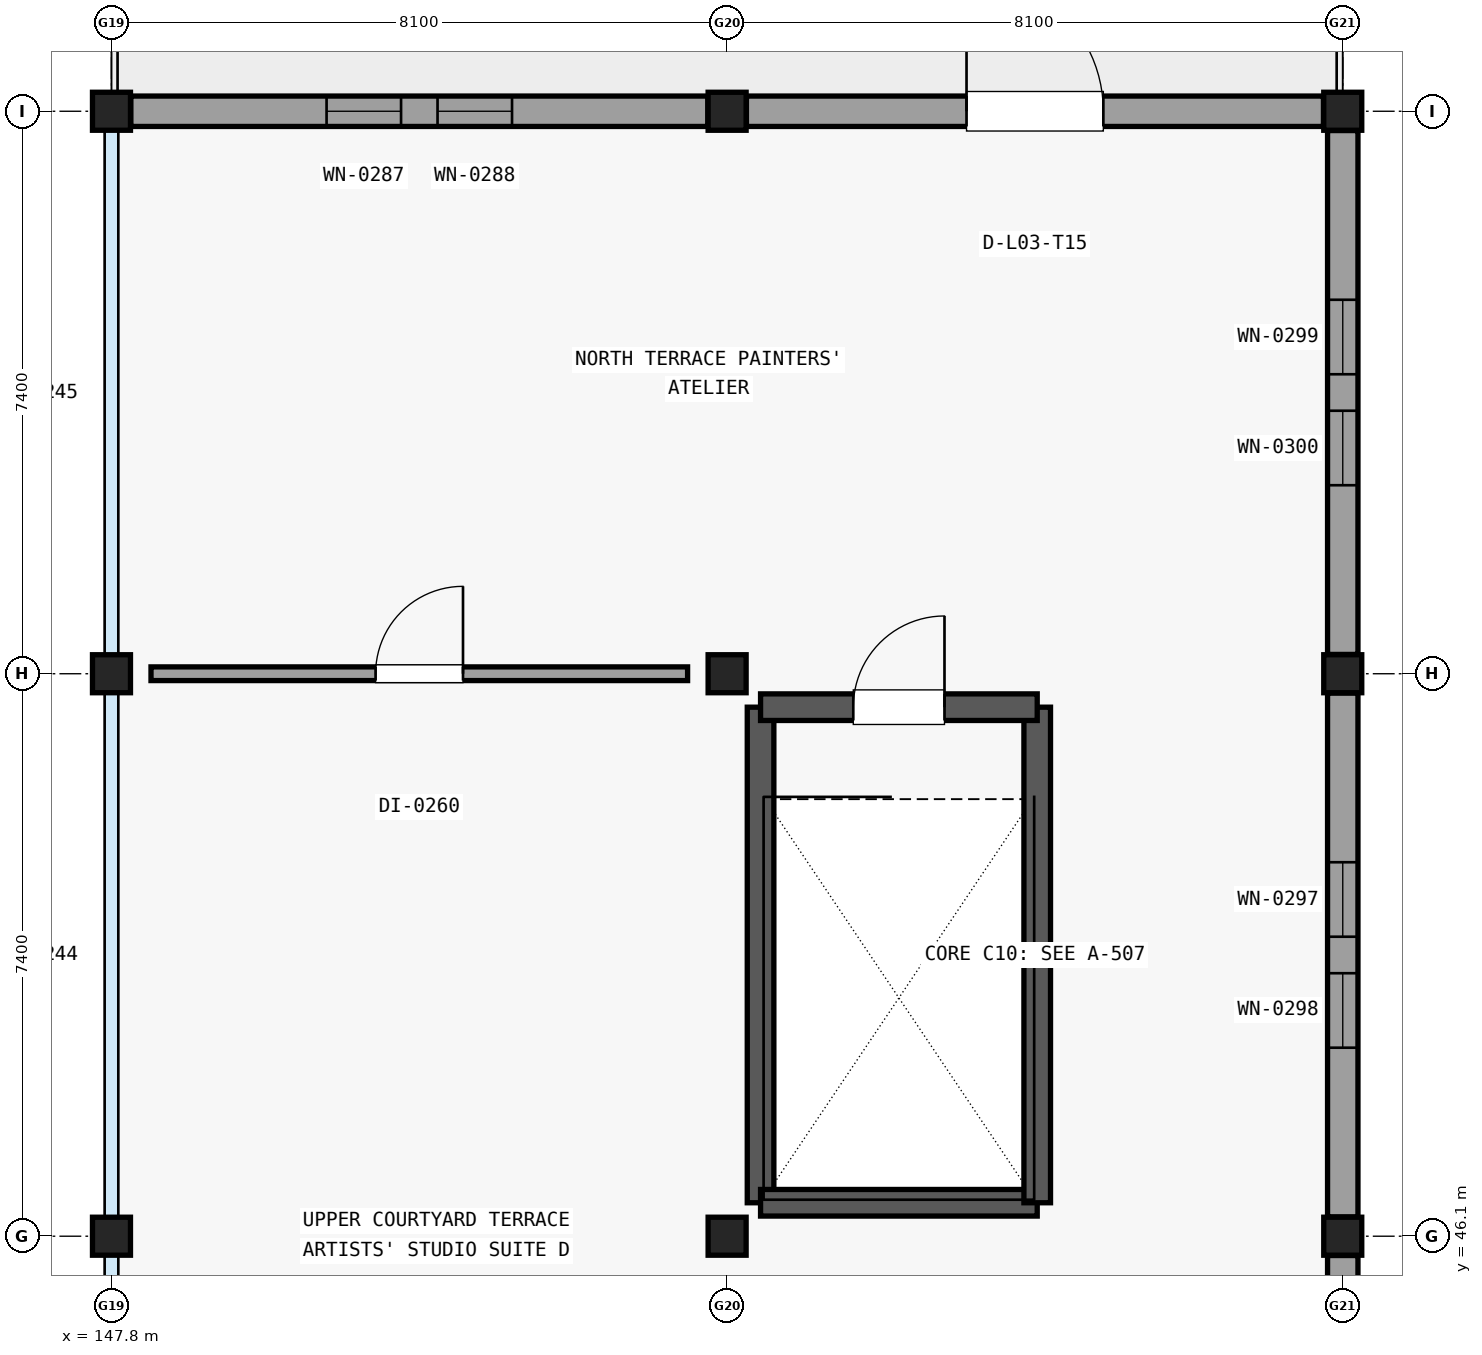
"""IFC4 building model, lengths in metres.
Left out: names, types, materials, properties, quantities, classifications, styles, units other than length and angle.
Written with IfcOpenShell. Run it as: python <this file> out.ifc"""

import sys

from ifc_helpers import new_model, si_unit, direction, frame, frame_2d, origin, origin_2d, place, context, subcontext, project, spatial, rectangle, extrude, element, fill, save


model = new_model("IFC4")
c1 = context("Model", 3, precision=1e-05, world=origin(), true_north=direction((0.0, 1.0)))
c2 = subcontext(c1, "Body", "Model", "MODEL_VIEW")
j1 = project(units=[si_unit("LENGTHUNIT", "METRE"), si_unit("PLANEANGLEUNIT", "RADIAN")], contexts=[c1])
p1 = place(None, origin())
s1 = spatial("IfcSite", under=j1, at=p1, CompositionType="ELEMENT")
p2 = place(p1, origin())
s2 = spatial("IfcBuilding", under=s1, at=p2, CompositionType="ELEMENT")
p3 = place(p2, frame((0.0, 0.0, 13.8)))
s3 = spatial("IfcBuildingStorey", under=s2, at=p3, CompositionType="ELEMENT", Elevation=13.8)
for number, where, z_axis, x_axis in (
    (1, (147.8, 46.1, 0.0), (0.0, 0.0, 1.0), (1.0, 0.0, 0.0)),
    (2, (147.8, 53.5, 0.0), (0.0, 0.0, 1.0), (1.0, 0.0, 0.0)),
    (3, (147.8, 60.9, 0.0), (0.0, 0.0, 1.0), (1.0, 0.0, 0.0)),
    (4, (155.9, 46.1, 0.0), (0.0, 0.0, 1.0), (1.0, 0.0, 0.0)),
    (5, (155.9, 53.5, 0.0), (0.0, 0.0, 1.0), (1.0, 0.0, 0.0)),
    (6, (155.9, 60.9, 0.0), (0.0, 0.0, 1.0), (1.0, 0.0, 0.0)),
    (7, (164.0, 46.1, 0.0), (0.0, 0.0, 1.0), (1.0, 0.0, 0.0)),
    (8, (164.0, 53.5, 0.0), (0.0, 0.0, 1.0), (1.0, 0.0, 0.0)),
    (9, (164.0, 60.9, 0.0), (0.0, 0.0, 1.0), (1.0, 0.0, 0.0)),
):
    element("IfcColumn", number, at=place(p3, frame(where, z_axis=z_axis, x_axis=x_axis)), inside=s3, PredefinedType="COLUMN", context=c2, shape_type="SweptSolid", body=[
        extrude(rectangle(XDim=0.5, YDim=0.5, at=origin_2d()), origin(), (0.0, 0.0, 1.0), 3.38),
    ])
p4 = place(p3, frame((148.054, 60.9, 0.0), z_axis=(0.0, 0.0, 1.0), x_axis=(1.0, 0.0, 0.0)))
e10 = element("IfcWall", 10, at=p4, inside=s3, PredefinedType="SOLIDWALL", context=c2, shape_type="SweptSolid", body=[
    extrude(rectangle(XDim=7.592, YDim=0.4, at=frame_2d((3.796, 0.0))), origin(), (0.0, 0.0, 1.0), 2.908),
])
p5 = place(p4, frame((2.576, 0.0, 0.6)))
e11 = element("IfcOpeningElement", 11, at=p5, cuts=e10, PredefinedType="OPENING", context=c2, shape_type="SweptSolid", body=[
    extrude(rectangle(XDim=0.98, YDim=1.95, at=frame_2d((0.49, 0.975))), frame((0.0, 0.21, 0.0), z_axis=(0.0, -1.0, 0.0), x_axis=(1.0, 0.0, 0.0)), (0.0, 0.0, 1.0), 0.42),
])
p6 = place(p4, frame((4.036, 0.0, 0.6)))
e12 = element("IfcOpeningElement", 12, at=p6, cuts=e10, PredefinedType="OPENING", context=c2, shape_type="SweptSolid", body=[
    extrude(rectangle(XDim=0.98, YDim=1.95, at=frame_2d((0.49, 0.975))), frame((0.0, 0.21, 0.0), z_axis=(0.0, -1.0, 0.0), x_axis=(1.0, 0.0, 0.0)), (0.0, 0.0, 1.0), 0.42),
])
p7 = place(p3, frame((164.0, 45.846, 0.0), z_axis=(0.0, 0.0, 1.0), x_axis=(0.0, -1.0, 0.0)))
e13 = element("IfcWall", 13, at=p7, inside=s3, PredefinedType="SOLIDWALL", context=c2, shape_type="SweptSolid", body=[
    extrude(rectangle(XDim=6.892, YDim=0.4, at=frame_2d((3.446, 0.0))), origin(), (0.0, 0.0, 1.0), 2.908),
])
p8 = place(p7, frame((2.226, 0.0, 0.6)))
e14 = element("IfcOpeningElement", 14, at=p8, cuts=e13, PredefinedType="OPENING", context=c2, shape_type="SweptSolid", body=[
    extrude(rectangle(XDim=0.98, YDim=1.95, at=frame_2d((0.49, 0.975))), frame((0.0, 0.21, 0.0), z_axis=(0.0, -1.0, 0.0), x_axis=(1.0, 0.0, 0.0)), (0.0, 0.0, 1.0), 0.42),
])
p9 = place(p7, frame((3.686, 0.0, 0.6)))
e15 = element("IfcOpeningElement", 15, at=p9, cuts=e13, PredefinedType="OPENING", context=c2, shape_type="SweptSolid", body=[
    extrude(rectangle(XDim=0.98, YDim=1.95, at=frame_2d((0.49, 0.975))), frame((0.0, 0.21, 0.0), z_axis=(0.0, -1.0, 0.0), x_axis=(1.0, 0.0, 0.0)), (0.0, 0.0, 1.0), 0.42),
])
p10 = place(p3, frame((164.0, 53.246, 0.0), z_axis=(0.0, 0.0, 1.0), x_axis=(0.0, -1.0, 0.0)))
e16 = element("IfcWall", 16, at=p10, inside=s3, PredefinedType="SOLIDWALL", context=c2, shape_type="SweptSolid", body=[
    extrude(rectangle(XDim=6.892, YDim=0.4, at=frame_2d((3.446, 0.0))), origin(), (0.0, 0.0, 1.0), 2.908),
])
p11 = place(p10, frame((2.226, 0.0, 0.6)))
e17 = element("IfcOpeningElement", 17, at=p11, cuts=e16, PredefinedType="OPENING", context=c2, shape_type="SweptSolid", body=[
    extrude(rectangle(XDim=0.98, YDim=1.95, at=frame_2d((0.49, 0.975))), frame((0.0, 0.21, 0.0), z_axis=(0.0, -1.0, 0.0), x_axis=(1.0, 0.0, 0.0)), (0.0, 0.0, 1.0), 0.42),
])
p12 = place(p10, frame((3.686, 0.0, 0.6)))
e18 = element("IfcOpeningElement", 18, at=p12, cuts=e16, PredefinedType="OPENING", context=c2, shape_type="SweptSolid", body=[
    extrude(rectangle(XDim=0.98, YDim=1.95, at=frame_2d((0.49, 0.975))), frame((0.0, 0.21, 0.0), z_axis=(0.0, -1.0, 0.0), x_axis=(1.0, 0.0, 0.0)), (0.0, 0.0, 1.0), 0.42),
])
p13 = place(p3, frame((156.154, 60.9, 0.0), z_axis=(0.0, 0.0, 1.0), x_axis=(1.0, 0.0, 0.0)))
e19 = element("IfcWall", 19, at=p13, inside=s3, PredefinedType="SOLIDWALL", context=c2, shape_type="SweptSolid", body=[
    extrude(rectangle(XDim=7.592, YDim=0.4, at=frame_2d((3.796, 0.0))), origin(), (0.0, 0.0, 1.0), 2.908),
])
p14 = place(p13, frame((2.896, 0.0, 0.0)))
e20 = element("IfcOpeningElement", 20, at=p14, cuts=e19, PredefinedType="OPENING", context=c2, shape_type="SweptSolid", body=[
    extrude(rectangle(XDim=1.8, YDim=2.2, at=frame_2d((0.9, 1.1))), frame((0.0, 0.21, 0.0), z_axis=(0.0, -1.0, 0.0), x_axis=(1.0, 0.0, 0.0)), (0.0, 0.0, 1.0), 0.42),
])
p15 = place(p3, frame((164.0, 60.646, 0.0), z_axis=(0.0, 0.0, 1.0), x_axis=(0.0, -1.0, 0.0)))
e21 = element("IfcWall", 21, at=p15, inside=s3, PredefinedType="SOLIDWALL", context=c2, shape_type="SweptSolid", body=[
    extrude(rectangle(XDim=6.892, YDim=0.4, at=frame_2d((3.446, 0.0))), origin(), (0.0, 0.0, 1.0), 2.908),
])
p16 = place(p15, frame((2.226, 0.0, 0.6)))
e22 = element("IfcOpeningElement", 22, at=p16, cuts=e21, PredefinedType="OPENING", context=c2, shape_type="SweptSolid", body=[
    extrude(rectangle(XDim=0.98, YDim=1.95, at=frame_2d((0.49, 0.975))), frame((0.0, 0.21, 0.0), z_axis=(0.0, -1.0, 0.0), x_axis=(1.0, 0.0, 0.0)), (0.0, 0.0, 1.0), 0.42),
])
p17 = place(p15, frame((3.686, 0.0, 0.6)))
e23 = element("IfcOpeningElement", 23, at=p17, cuts=e21, PredefinedType="OPENING", context=c2, shape_type="SweptSolid", body=[
    extrude(rectangle(XDim=0.98, YDim=1.95, at=frame_2d((0.49, 0.975))), frame((0.0, 0.21, 0.0), z_axis=(0.0, -1.0, 0.0), x_axis=(1.0, 0.0, 0.0)), (0.0, 0.0, 1.0), 0.42),
])
p18 = place(p3, frame((156.34, 46.54, 0.0), z_axis=(0.0, 0.0, 1.0), x_axis=(0.0, 1.0, 0.0)))
e24 = element("IfcWall", 24, at=p18, inside=s3, PredefinedType="SHEAR", context=c2, shape_type="SweptSolid", body=[
    extrude(rectangle(XDim=6.52, YDim=0.35, at=frame_2d((3.26, 0.0))), origin(), (0.0, 0.0, 1.0), 3.375),
])
p19 = place(p3, frame((156.34, 46.54, 0.0), z_axis=(0.0, 0.0, 1.0), x_axis=(1.0, 0.0, 0.0)))
e25 = element("IfcWall", 25, at=p19, inside=s3, PredefinedType="SHEAR", context=c2, shape_type="SweptSolid", body=[
    extrude(rectangle(XDim=3.64, YDim=0.35, at=frame_2d((1.82, 0.0))), origin(), (0.0, 0.0, 1.0), 3.375),
])
p20 = place(p3, frame((159.98, 46.54, 0.0), z_axis=(0.0, 0.0, 1.0), x_axis=(0.0, 1.0, 0.0)))
e26 = element("IfcWall", 26, at=p20, inside=s3, PredefinedType="SHEAR", context=c2, shape_type="SweptSolid", body=[
    extrude(rectangle(XDim=6.52, YDim=0.35, at=frame_2d((3.26, 0.0))), origin(), (0.0, 0.0, 1.0), 3.375),
])
p21 = place(p3, frame((156.34, 53.06, 0.0), z_axis=(0.0, 0.0, 1.0), x_axis=(1.0, 0.0, 0.0)))
e27 = element("IfcWall", 27, at=p21, inside=s3, PredefinedType="SHEAR", context=c2, shape_type="SweptSolid", body=[
    extrude(rectangle(XDim=3.64, YDim=0.35, at=frame_2d((1.82, 0.0))), origin(), (0.0, 0.0, 1.0), 3.375),
])
p22 = place(p21, frame((1.22, 0.0, 0.0)))
e28 = element("IfcOpeningElement", 28, at=p22, cuts=e27, PredefinedType="OPENING", context=c2, shape_type="SweptSolid", body=[
    extrude(rectangle(XDim=1.2, YDim=2.15, at=frame_2d((0.6, 1.075))), frame((0.0, 0.185, 0.0), z_axis=(0.0, -1.0, 0.0), x_axis=(1.0, 0.0, 0.0)), (0.0, 0.0, 1.0), 0.37),
])
p23 = place(p3, frame((148.32, 53.5, 0.0), z_axis=(0.0, 0.0, 1.0), x_axis=(1.0, 0.0, 0.0)))
e29 = element("IfcWall", 29, at=p23, inside=s3, PredefinedType="PARTITIONING", context=c2, shape_type="SweptSolid", body=[
    extrude(rectangle(XDim=7.06, YDim=0.18, at=frame_2d((3.53, 0.0))), origin(), (0.0, 0.0, 1.0), 2.913),
])
p24 = place(p23, frame((2.955, 0.0, 0.0)))
e30 = element("IfcOpeningElement", 30, at=p24, cuts=e29, PredefinedType="OPENING", context=c2, shape_type="SweptSolid", body=[
    extrude(rectangle(XDim=1.15, YDim=2.15, at=frame_2d((0.575, 1.075))), frame((0.0, 0.1, 0.0), z_axis=(0.0, -1.0, 0.0), x_axis=(1.0, 0.0, 0.0)), (0.0, 0.0, 1.0), 0.2),
])
p25 = place(p5, origin())
e31 = element("IfcWindow", 31, at=p25, inside=s3, PartitioningType="SINGLE_PANEL", PredefinedType="WINDOW", context=c2, shape_type="SweptSolid", body=[
    extrude(rectangle(XDim=0.98, YDim=1.95, at=frame_2d((0.49, 0.975))), frame((0.0, 0.03, 0.0), z_axis=(0.0, -1.0, 0.0), x_axis=(1.0, 0.0, 0.0)), (0.0, 0.0, 1.0), 0.06),
])
fill(e11, e31)
p26 = place(p6, origin())
e32 = element("IfcWindow", 32, at=p26, inside=s3, PartitioningType="SINGLE_PANEL", PredefinedType="WINDOW", context=c2, shape_type="SweptSolid", body=[
    extrude(rectangle(XDim=0.98, YDim=1.95, at=frame_2d((0.49, 0.975))), frame((0.0, 0.03, 0.0), z_axis=(0.0, -1.0, 0.0), x_axis=(1.0, 0.0, 0.0)), (0.0, 0.0, 1.0), 0.06),
])
fill(e12, e32)
p27 = place(p11, origin())
e33 = element("IfcWindow", 33, at=p27, inside=s3, PartitioningType="SINGLE_PANEL", PredefinedType="WINDOW", context=c2, shape_type="SweptSolid", body=[
    extrude(rectangle(XDim=0.98, YDim=1.95, at=frame_2d((0.49, 0.975))), frame((0.0, 0.03, 0.0), z_axis=(0.0, -1.0, 0.0), x_axis=(1.0, 0.0, 0.0)), (0.0, 0.0, 1.0), 0.06),
])
fill(e17, e33)
p28 = place(p12, origin())
e34 = element("IfcWindow", 34, at=p28, inside=s3, PartitioningType="SINGLE_PANEL", PredefinedType="WINDOW", context=c2, shape_type="SweptSolid", body=[
    extrude(rectangle(XDim=0.98, YDim=1.95, at=frame_2d((0.49, 0.975))), frame((0.0, 0.03, 0.0), z_axis=(0.0, -1.0, 0.0), x_axis=(1.0, 0.0, 0.0)), (0.0, 0.0, 1.0), 0.06),
])
fill(e18, e34)
p29 = place(p14, origin())
e35 = element("IfcDoor", 35, at=p29, inside=s3, OperationType="SINGLE_SWING_LEFT", PredefinedType="DOOR", context=c2, shape_type="SweptSolid", body=[
    extrude(rectangle(XDim=1.8, YDim=2.2, at=frame_2d((0.9, 1.1))), frame((0.0, 0.025, 0.0), z_axis=(0.0, -1.0, 0.0), x_axis=(1.0, 0.0, 0.0)), (0.0, 0.0, 1.0), 0.05),
])
fill(e20, e35)
p30 = place(p16, origin())
e36 = element("IfcWindow", 36, at=p30, inside=s3, PartitioningType="SINGLE_PANEL", PredefinedType="WINDOW", context=c2, shape_type="SweptSolid", body=[
    extrude(rectangle(XDim=0.98, YDim=1.95, at=frame_2d((0.49, 0.975))), frame((0.0, 0.03, 0.0), z_axis=(0.0, -1.0, 0.0), x_axis=(1.0, 0.0, 0.0)), (0.0, 0.0, 1.0), 0.06),
])
fill(e22, e36)
p31 = place(p17, origin())
e37 = element("IfcWindow", 37, at=p31, inside=s3, PartitioningType="SINGLE_PANEL", PredefinedType="WINDOW", context=c2, shape_type="SweptSolid", body=[
    extrude(rectangle(XDim=0.98, YDim=1.95, at=frame_2d((0.49, 0.975))), frame((0.0, 0.03, 0.0), z_axis=(0.0, -1.0, 0.0), x_axis=(1.0, 0.0, 0.0)), (0.0, 0.0, 1.0), 0.06),
])
fill(e23, e37)
p32 = place(p22, origin())
e38 = element("IfcDoor", 38, at=p32, inside=s3, OperationType="SINGLE_SWING_RIGHT", PredefinedType="DOOR", context=c2, shape_type="SweptSolid", body=[
    extrude(rectangle(XDim=1.2, YDim=2.15, at=frame_2d((0.6, 1.075))), frame((0.0, 0.025, 0.0), z_axis=(0.0, -1.0, 0.0), x_axis=(1.0, 0.0, 0.0)), (0.0, 0.0, 1.0), 0.05),
])
fill(e28, e38)
p33 = place(p24, origin())
e39 = element("IfcDoor", 39, at=p33, inside=s3, OperationType="SINGLE_SWING_RIGHT", PredefinedType="DOOR", context=c2, shape_type="SweptSolid", body=[
    extrude(rectangle(XDim=1.15, YDim=2.15, at=frame_2d((0.575, 1.075))), frame((0.0, 0.025, 0.0), z_axis=(0.0, -1.0, 0.0), x_axis=(1.0, 0.0, 0.0)), (0.0, 0.0, 1.0), 0.05),
])
fill(e30, e39)
save(model, sys.argv[1])
